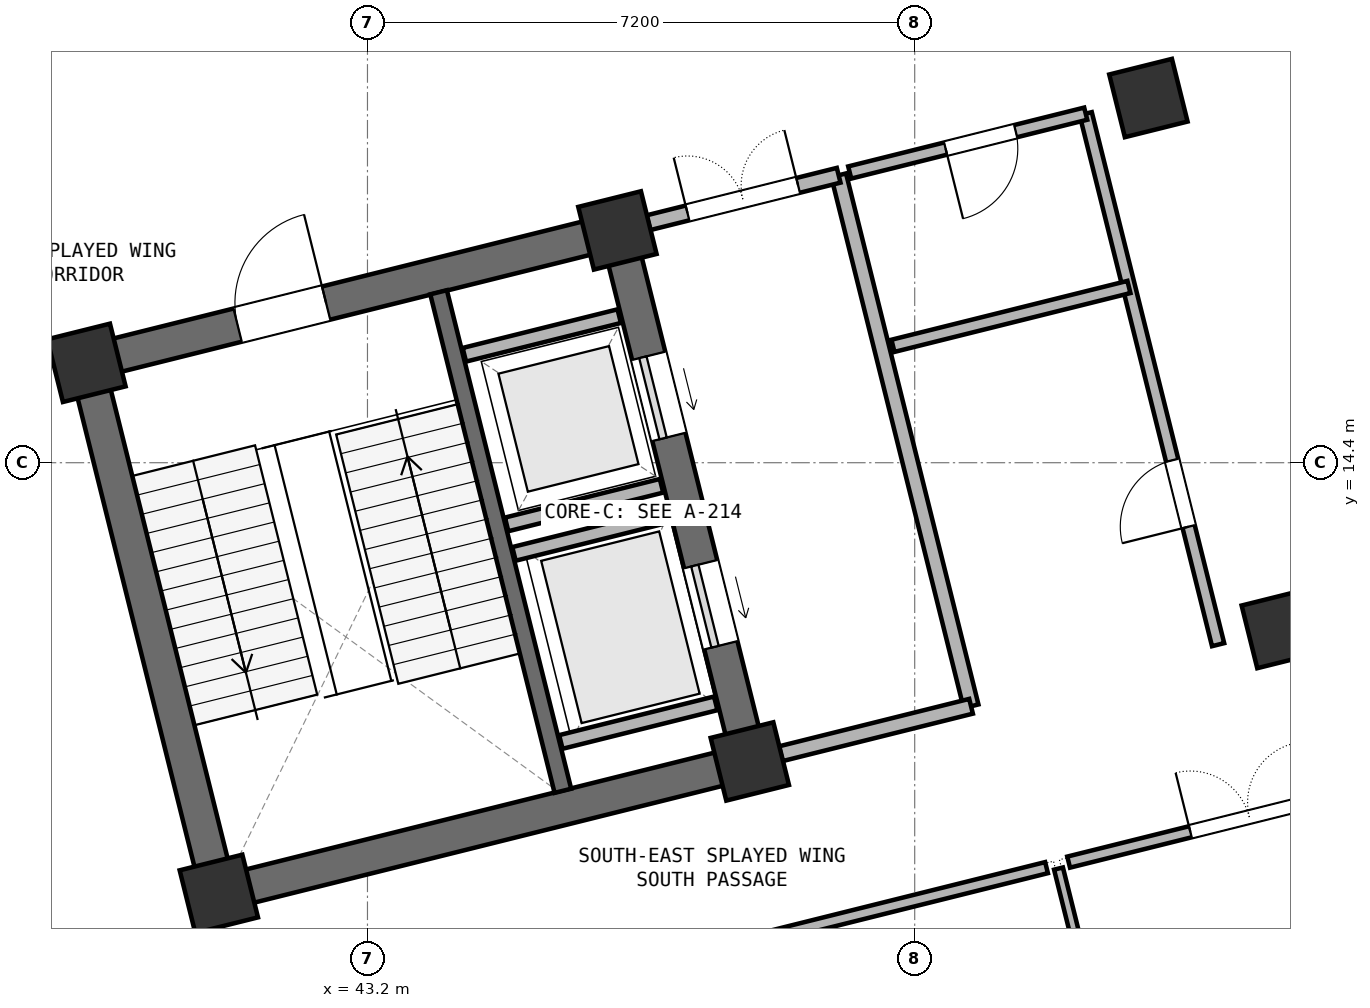
"""IFC4 building model, lengths in metres.
Left out: names, types, materials, properties, quantities, classifications, styles, units other than length and angle.
Written with IfcOpenShell. Run it as: python <this file> out.ifc"""

import sys

from ifc_helpers import new_model, si_unit, direction, frame, frame_2d, origin, origin_2d, place, context, subcontext, project, spatial, rectangle, extrude, element, fill, save


model = new_model("IFC4")
c1 = context("Model", 3, precision=1e-05, world=origin(), true_north=direction((0.0, 1.0)))
c2 = subcontext(c1, "Body", "Model", "MODEL_VIEW")
j1 = project(units=[si_unit("LENGTHUNIT", "METRE"), si_unit("PLANEANGLEUNIT", "RADIAN")], contexts=[c1])
p1 = place(None, origin())
s1 = spatial("IfcSite", under=j1, at=p1, CompositionType="ELEMENT")
p2 = place(p1, origin())
s2 = spatial("IfcBuilding", under=s1, at=p2, CompositionType="ELEMENT")
p3 = place(p2, frame((0.0, 0.0, 5.4)))
s3 = spatial("IfcBuildingStorey", under=s2, at=p3, CompositionType="ELEMENT", Elevation=5.4)
for number, where, z_axis, x_axis in (
    (1, (41.244, 8.728, 0.0), (0.0, 0.0, 1.0), (0.97, 0.242, 0.0)),
    (2, (39.502, 15.714, 0.0), (0.0, 0.0, 1.0), (0.97, 0.242, 0.0)),
    (3, (48.23, 10.47, 0.0), (0.0, 0.0, 1.0), (0.97, 0.242, 0.0)),
    (4, (46.489, 17.456, 0.0), (0.0, 0.0, 1.0), (0.97, 0.242, 0.0)),
    (5, (55.217, 12.212, 0.0), (0.0, 0.0, 1.0), (0.97, 0.242, 0.0)),
    (6, (53.475, 19.198, 0.0), (0.0, 0.0, 1.0), (0.97, 0.242, 0.0)),
):
    element("IfcColumn", number, at=place(p3, frame(where, z_axis=z_axis, x_axis=x_axis)), inside=s3, PredefinedType="COLUMN", context=c2, shape_type="SweptSolid", body=[
        extrude(rectangle(XDim=0.85, YDim=0.85, at=origin_2d()), origin(), (0.0, 0.0, 1.0), 4.8),
    ])
p4 = place(p3, frame((41.584, 8.813, 0.0), z_axis=(0.0, 0.0, 1.0), x_axis=(0.970294759049, 0.241925774902, 0.0)))
e7 = element("IfcWall", 7, at=p4, inside=s3, PredefinedType="SHEAR", context=c2, shape_type="SweptSolid", body=[
    extrude(rectangle(XDim=6.5, YDim=0.45, at=frame_2d((3.25, 0.0))), origin(), (0.0, 0.0, 1.0), 4.8),
])
p5 = place(p3, frame((48.146, 10.809, 0.0), z_axis=(0.0, 0.0, 1.0), x_axis=(-0.241925774902, 0.970294759049, 0.0)))
e8 = element("IfcWall", 8, at=p5, inside=s3, PredefinedType="SHEAR", context=c2, shape_type="SweptSolid", body=[
    extrude(rectangle(XDim=6.5, YDim=0.45, at=frame_2d((3.25, 0.0))), origin(), (0.0, 0.0, 1.0), 4.8),
])
p6 = place(p5, frame((1.225, 0.0, 0.0)))
e9 = element("IfcOpeningElement", 9, at=p6, cuts=e8, PredefinedType="OPENING", context=c2, shape_type="SweptSolid", body=[
    extrude(rectangle(XDim=1.1, YDim=2.2, at=frame_2d((0.55, 1.1))), frame((0.0, 0.235, 0.0), z_axis=(0.0, -1.0, 0.0), x_axis=(1.0, 0.0, 0.0)), (0.0, 0.0, 1.0), 0.47),
])
p7 = place(p5, frame((4.05, 0.0, 0.0)))
e10 = element("IfcOpeningElement", 10, at=p7, cuts=e8, PredefinedType="OPENING", context=c2, shape_type="SweptSolid", body=[
    extrude(rectangle(XDim=1.1, YDim=2.2, at=frame_2d((0.55, 1.1))), frame((0.0, 0.235, 0.0), z_axis=(0.0, -1.0, 0.0), x_axis=(1.0, 0.0, 0.0)), (0.0, 0.0, 1.0), 0.47),
])
p8 = place(p3, frame((46.149, 17.371, 0.0), z_axis=(0.0, 0.0, 1.0), x_axis=(-0.970294759049, -0.241925774902, 0.0)))
e11 = element("IfcWall", 11, at=p8, inside=s3, PredefinedType="SHEAR", context=c2, shape_type="SweptSolid", body=[
    extrude(rectangle(XDim=6.5, YDim=0.45, at=frame_2d((3.25, 0.0))), origin(), (0.0, 0.0, 1.0), 4.8),
])
p9 = place(p8, frame((3.6, 0.0, 0.0)))
e12 = element("IfcOpeningElement", 12, at=p9, cuts=e11, PredefinedType="OPENING", context=c2, shape_type="SweptSolid", body=[
    extrude(rectangle(XDim=1.2, YDim=2.2, at=frame_2d((0.6, 1.1))), frame((0.0, 0.235, 0.0), z_axis=(0.0, -1.0, 0.0), x_axis=(1.0, 0.0, 0.0)), (0.0, 0.0, 1.0), 0.47),
])
p10 = place(p3, frame((39.587, 15.375, 0.0), z_axis=(0.0, 0.0, 1.0), x_axis=(0.241925774902, -0.970294759049, 0.0)))
e13 = element("IfcWall", 13, at=p10, inside=s3, PredefinedType="SHEAR", context=c2, shape_type="SweptSolid", body=[
    extrude(rectangle(XDim=6.5, YDim=0.45, at=frame_2d((3.25, 0.0))), origin(), (0.0, 0.0, 1.0), 4.8),
])
p11 = place(p3, frame((45.771, 10.083, 0.0), z_axis=(0.0, 0.0, 1.0), x_axis=(-0.241898249226, 0.970301621673, 0.0)))
e14 = element("IfcWall", 14, at=p11, inside=s3, PredefinedType="SHEAR", context=c2, shape_type="SweptSolid", body=[
    extrude(rectangle(XDim=6.76, YDim=0.225, at=frame_2d((3.38, 0.0))), origin(), (0.0, 0.0, 1.0), 4.8),
])
for number, where, z_axis, x_axis in (
    (15, (45.745, 10.726, 0.0), (0.0, 0.0, 1.0), (0.97, 0.242, 0.0)),
    (16, (45.128, 13.2, 0.0), (0.0, 0.0, 1.0), (0.97, 0.242, 0.0)),
    (17, (45.031, 13.588, 0.0), (0.0, 0.0, 1.0), (0.97, 0.242, 0.0)),
    (18, (44.475, 15.82, 0.0), (0.0, 0.0, 1.0), (0.97, 0.242, 0.0)),
):
    element("IfcWall", number, at=place(p3, frame(where, z_axis=z_axis, x_axis=x_axis)), inside=s3, PredefinedType="PARTITIONING", context=c2, shape_type="SweptSolid", body=[
        extrude(rectangle(XDim=2.1, YDim=0.185, at=frame_2d((1.05, 0.0))), origin(), (0.0, 0.0, 1.0), 4.8),
    ])
p12 = place(p3, frame((51.141, 11.196, 0.0), z_axis=(0.0, 0.0, 1.0), x_axis=(-0.241937193493, 0.970291911955, 0.0)))
e19 = element("IfcWall", 19, at=p12, inside=s3, PredefinedType="PARTITIONING", context=c2, shape_type="SweptSolid", body=[
    extrude(rectangle(XDim=7.2, YDim=0.2, at=frame_2d((3.6, 0.0))), origin(), (0.0, 0.0, 1.0), 3.52),
])
p13 = place(p3, frame((48.638, 10.572, 0.0), z_axis=(0.0, 0.0, 1.0), x_axis=(0.970309259708, 0.2418676095, 0.0)))
e20 = element("IfcWall", 20, at=p13, inside=s3, PredefinedType="PARTITIONING", context=c2, shape_type="SweptSolid", body=[
    extrude(rectangle(XDim=2.58, YDim=0.2, at=frame_2d((1.29, 0.0))), origin(), (0.0, 0.0, 1.0), 3.52),
])
p14 = place(p3, frame((49.399, 18.182, 0.0), z_axis=(0.0, 0.0, 1.0), x_axis=(-0.970309259708, -0.2418676095, 0.0)))
e21 = element("IfcWall", 21, at=p14, inside=s3, PredefinedType="PARTITIONING", context=c2, shape_type="SweptSolid", body=[
    extrude(rectangle(XDim=2.58, YDim=0.2, at=frame_2d((1.29, 0.0))), origin(), (0.0, 0.0, 1.0), 3.52),
])
p15 = place(p14, frame((0.55, 0.0, 0.0)))
e22 = element("IfcOpeningElement", 22, at=p15, cuts=e21, PredefinedType="OPENING", context=c2, shape_type="SweptSolid", body=[
    extrude(rectangle(XDim=1.5, YDim=2.2, at=frame_2d((0.75, 1.1))), frame((0.0, 0.11, 0.0), z_axis=(0.0, -1.0, 0.0), x_axis=(1.0, 0.0, 0.0)), (0.0, 0.0, 1.0), 0.22),
])
p16 = place(p3, frame((54.392, 12.006, 0.0), z_axis=(0.0, 0.0, 1.0), x_axis=(-0.241937193493, 0.970291911955, 0.0)))
e23 = element("IfcWall", 23, at=p16, inside=s3, PredefinedType="PARTITIONING", context=c2, shape_type="SweptSolid", body=[
    extrude(rectangle(XDim=7.2, YDim=0.165, at=frame_2d((3.6, 0.0))), origin(), (0.0, 0.0, 1.0), 3.52),
])
p17 = place(p16, frame((1.6, 0.0, 0.0)))
e24 = element("IfcOpeningElement", 24, at=p17, cuts=e23, PredefinedType="OPENING", context=c2, shape_type="SweptSolid", body=[
    extrude(rectangle(XDim=0.9, YDim=2.15, at=frame_2d((0.45, 1.075))), frame((0.0, 0.093, 0.0), z_axis=(0.0, -1.0, 0.0), x_axis=(1.0, 0.0, 0.0)), (0.0, 0.0, 1.0), 0.185),
])
p18 = place(p3, frame((52.65, 18.992, 0.0), z_axis=(0.0, 0.0, 1.0), x_axis=(-0.970294894235, -0.241925232711, 0.0)))
e25 = element("IfcWall", 25, at=p18, inside=s3, PredefinedType="PARTITIONING", context=c2, shape_type="SweptSolid", body=[
    extrude(rectangle(XDim=3.2, YDim=0.165, at=frame_2d((1.6, 0.0))), origin(), (0.0, 0.0, 1.0), 3.52),
])
p19 = place(p18, frame((0.95, 0.0, 0.0)))
e26 = element("IfcOpeningElement", 26, at=p19, cuts=e25, PredefinedType="OPENING", context=c2, shape_type="SweptSolid", body=[
    extrude(rectangle(XDim=0.95, YDim=2.15, at=frame_2d((0.475, 1.075))), frame((0.0, 0.093, 0.0), z_axis=(0.0, -1.0, 0.0), x_axis=(1.0, 0.0, 0.0)), (0.0, 0.0, 1.0), 0.185),
])
p20 = place(p3, frame((50.114, 15.938, 0.0), z_axis=(0.0, 0.0, 1.0), x_axis=(0.970294894235, 0.241925232711, 0.0)))
e27 = element("IfcWall", 27, at=p20, inside=s3, PredefinedType="PARTITIONING", context=c2, shape_type="SweptSolid", body=[
    extrude(rectangle(XDim=3.2, YDim=0.165, at=frame_2d((1.6, 0.0))), origin(), (0.0, 0.0, 1.0), 3.52),
])
p21 = place(p3, frame((35.542, 4.936, 0.0), z_axis=(0.0, 0.0, 1.0), x_axis=(0.970294320027, 0.241927535687, 0.0)))
e28 = element("IfcWall", 28, at=p21, inside=s3, PredefinedType="PARTITIONING", context=c2, shape_type="SweptSolid", body=[
    extrude(rectangle(XDim=17.1, YDim=0.15, at=frame_2d((8.55, 0.0))), origin(), (0.0, 0.0, 1.0), 3.52),
])
p22 = place(p21, frame((7.75, 0.0, 0.0)))
e29 = element("IfcOpeningElement", 29, at=p22, cuts=e28, PredefinedType="OPENING", context=c2, shape_type="SweptSolid", body=[
    extrude(rectangle(XDim=1.6, YDim=2.2, at=frame_2d((0.8, 1.1))), frame((0.0, 0.085, 0.0), z_axis=(0.0, -1.0, 0.0), x_axis=(1.0, 0.0, 0.0)), (0.0, 0.0, 1.0), 0.17),
])
p23 = place(p3, frame((52.426, 9.145, 0.0), z_axis=(0.0, 0.0, 1.0), x_axis=(0.970294759049, 0.241925774902, 0.0)))
e30 = element("IfcWall", 30, at=p23, inside=s3, PredefinedType="PARTITIONING", context=c2, shape_type="SweptSolid", body=[
    extrude(rectangle(XDim=19.5, YDim=0.15, at=frame_2d((9.75, 0.0))), origin(), (0.0, 0.0, 1.0), 3.52),
])
p24 = place(p23, frame((1.65, 0.0, 0.0)))
e31 = element("IfcOpeningElement", 31, at=p24, cuts=e30, PredefinedType="OPENING", context=c2, shape_type="SweptSolid", body=[
    extrude(rectangle(XDim=1.6, YDim=2.2, at=frame_2d((0.8, 1.1))), frame((0.0, 0.085, 0.0), z_axis=(0.0, -1.0, 0.0), x_axis=(1.0, 0.0, 0.0)), (0.0, 0.0, 1.0), 0.17),
])
p25 = place(p3, frame((53.422, 4.529, 0.0), z_axis=(0.0, 0.0, 1.0), x_axis=(-0.241945139998, 0.970289930501, 0.0)))
e32 = element("IfcWall", 32, at=p25, inside=s3, PredefinedType="PARTITIONING", context=c2, shape_type="SweptSolid", body=[
    extrude(rectangle(XDim=4.67, YDim=0.12, at=frame_2d((2.335, 0.0))), origin(), (0.0, 0.0, 1.0), 3.52),
])
p26 = place(p6, origin())
e33 = element("IfcDoor", 33, at=p26, inside=s3, OperationType="SLIDING_TO_LEFT", PredefinedType="DOOR", context=c2, shape_type="SweptSolid", body=[
    extrude(rectangle(XDim=1.1, YDim=2.2, at=frame_2d((0.55, 1.1))), frame((0.0, 0.025, 0.0), z_axis=(0.0, -1.0, 0.0), x_axis=(1.0, 0.0, 0.0)), (0.0, 0.0, 1.0), 0.05),
])
fill(e9, e33)
p27 = place(p7, origin())
e34 = element("IfcDoor", 34, at=p27, inside=s3, OperationType="SLIDING_TO_LEFT", PredefinedType="DOOR", context=c2, shape_type="SweptSolid", body=[
    extrude(rectangle(XDim=1.1, YDim=2.2, at=frame_2d((0.55, 1.1))), frame((0.0, 0.025, 0.0), z_axis=(0.0, -1.0, 0.0), x_axis=(1.0, 0.0, 0.0)), (0.0, 0.0, 1.0), 0.05),
])
fill(e10, e34)
p28 = place(p9, frame((1.2, 0.0, 0.0), z_axis=(0.0, 0.0, 1.0), x_axis=(-1.0, 0.0, 0.0)))
e35 = element("IfcDoor", 35, at=p28, inside=s3, OperationType="SINGLE_SWING_RIGHT", PredefinedType="DOOR", context=c2, shape_type="SweptSolid", body=[
    extrude(rectangle(XDim=1.2, YDim=2.2, at=frame_2d((0.6, 1.1))), frame((0.0, 0.025, 0.0), z_axis=(0.0, -1.0, 0.0), x_axis=(1.0, 0.0, 0.0)), (0.0, 0.0, 1.0), 0.05),
])
fill(e12, e35)
p29 = place(p15, frame((1.5, 0.0, 0.0), z_axis=(0.0, 0.0, 1.0), x_axis=(-1.0, 0.0, 0.0)))
e36 = element("IfcDoor", 36, at=p29, inside=s3, OperationType="DOUBLE_DOOR_SINGLE_SWING", PredefinedType="DOOR", context=c2, shape_type="SweptSolid", body=[
    extrude(rectangle(XDim=1.5, YDim=2.2, at=frame_2d((0.75, 1.1))), frame((0.0, 0.025, 0.0), z_axis=(0.0, -1.0, 0.0), x_axis=(1.0, 0.0, 0.0)), (0.0, 0.0, 1.0), 0.05),
])
fill(e22, e36)
p30 = place(p17, origin())
e37 = element("IfcDoor", 37, at=p30, inside=s3, OperationType="SINGLE_SWING_LEFT", PredefinedType="DOOR", context=c2, shape_type="SweptSolid", body=[
    extrude(rectangle(XDim=0.9, YDim=2.15, at=frame_2d((0.45, 1.075))), frame((0.0, 0.025, 0.0), z_axis=(0.0, -1.0, 0.0), x_axis=(1.0, 0.0, 0.0)), (0.0, 0.0, 1.0), 0.05),
])
fill(e24, e37)
p31 = place(p19, origin())
e38 = element("IfcDoor", 38, at=p31, inside=s3, OperationType="SINGLE_SWING_RIGHT", PredefinedType="DOOR", context=c2, shape_type="SweptSolid", body=[
    extrude(rectangle(XDim=0.95, YDim=2.15, at=frame_2d((0.475, 1.075))), frame((0.0, 0.025, 0.0), z_axis=(0.0, -1.0, 0.0), x_axis=(1.0, 0.0, 0.0)), (0.0, 0.0, 1.0), 0.05),
])
fill(e26, e38)
p32 = place(p24, origin())
e39 = element("IfcDoor", 39, at=p32, inside=s3, OperationType="DOUBLE_DOOR_SINGLE_SWING", PredefinedType="DOOR", context=c2, shape_type="SweptSolid", body=[
    extrude(rectangle(XDim=1.6, YDim=2.2, at=frame_2d((0.8, 1.1))), frame((0.0, 0.025, 0.0), z_axis=(0.0, -1.0, 0.0), x_axis=(1.0, 0.0, 0.0)), (0.0, 0.0, 1.0), 0.05),
])
fill(e31, e39)
save(model, sys.argv[1])
